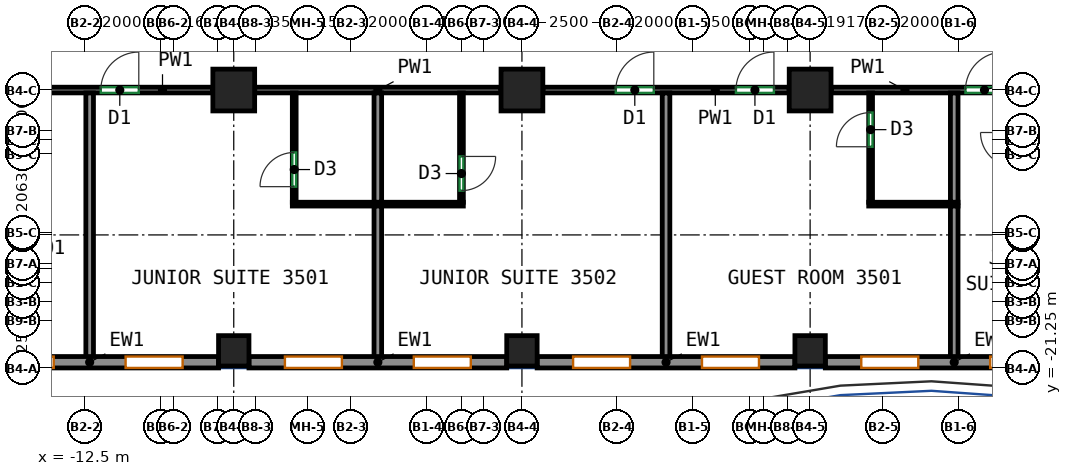
"""IFC4 building model, lengths in metres.
Left out: names, types, materials, properties, quantities, classifications, styles, units other than length and angle.
Written with IfcOpenShell. Run it as: python <this file> out.ifc"""

import sys

from ifc_helpers import new_model, si_unit, direction, frame, frame_2d, origin, origin_2d, place, context, subcontext, project, spatial, rectangle, extrude, source, transform, mapped, element, fill, save


model = new_model("IFC4")
c1 = context("Model", 3, precision=1e-05, world=origin(), true_north=direction((0.0, 1.0)))
c2 = subcontext(c1, "Body", "Model", "MODEL_VIEW")
j1 = project(units=[si_unit("LENGTHUNIT", "METRE"), si_unit("PLANEANGLEUNIT", "RADIAN")], contexts=[c1])
p1 = place(None, origin())
s1 = spatial("IfcSite", under=j1, at=p1, CompositionType="ELEMENT")
p2 = place(p1, origin())
s2 = spatial("IfcBuilding", under=s1, at=p2, CompositionType="ELEMENT")
p3 = place(p2, frame((0.0, 0.0, 154.1)))
s3 = spatial("IfcBuildingStorey", under=s2, at=p3, CompositionType="ELEMENT", Elevation=154.1)
m1 = source(origin(), c2, "Body", "SweptSolid", [
    extrude(rectangle(XDim=0.8, YDim=0.8, at=origin_2d()), origin(), (0.0, 0.0, 1.0), 3.12),
])
p4 = place(p3, frame((-8.583, -20.8, 0.0), z_axis=(0.0, 0.0, 1.0), x_axis=(1.0, 0.0, 0.0)))
e1 = element("IfcColumn", 1, at=p4, inside=s3, PredefinedType="COLUMN", context=c2, shape_type="MappedRepresentation", body=[
    mapped(m1, transform((0.0, 0.0, 0.0))),
])
m2 = source(origin(), c2, "Body", "SweptSolid", [
    extrude(rectangle(XDim=1.1, YDim=1.1, at=origin_2d()), origin(), (0.0, 0.0, 1.0), 3.12),
])
p5 = place(p3, frame((-8.583, -13.938, 0.0), z_axis=(0.0, 0.0, 1.0), x_axis=(1.0, 0.0, 0.0)))
e2 = element("IfcColumn", 2, at=p5, inside=s3, PredefinedType="COLUMN", context=c2, shape_type="MappedRepresentation", body=[
    mapped(m2, transform((0.0, 0.0, 0.0))),
])
p6 = place(p3, frame((-1.0, -20.8, 0.0), z_axis=(0.0, 0.0, 1.0), x_axis=(1.0, 0.0, 0.0)))
e3 = element("IfcColumn", 3, at=p6, inside=s3, PredefinedType="COLUMN", context=c2, shape_type="MappedRepresentation", body=[
    mapped(m1, transform((0.0, 0.0, 0.0))),
])
p7 = place(p3, frame((-1.0, -13.938, 0.0), z_axis=(0.0, 0.0, 1.0), x_axis=(1.0, 0.0, 0.0)))
e4 = element("IfcColumn", 4, at=p7, inside=s3, PredefinedType="COLUMN", context=c2, shape_type="MappedRepresentation", body=[
    mapped(m2, transform((0.0, 0.0, 0.0))),
])
p8 = place(p3, frame((6.583, -20.8, 0.0), z_axis=(0.0, 0.0, 1.0), x_axis=(1.0, 0.0, 0.0)))
e5 = element("IfcColumn", 5, at=p8, inside=s3, PredefinedType="COLUMN", context=c2, shape_type="MappedRepresentation", body=[
    mapped(m1, transform((0.0, 0.0, 0.0))),
])
p9 = place(p3, frame((6.583, -13.938, 0.0), z_axis=(0.0, 0.0, 1.0), x_axis=(1.0, 0.0, 0.0)))
e6 = element("IfcColumn", 6, at=p9, inside=s3, PredefinedType="COLUMN", context=c2, shape_type="MappedRepresentation", body=[
    mapped(m2, transform((0.0, 0.0, 0.0))),
])
m3 = source(origin(), c2, "Body", "SweptSolid", [
    extrude(rectangle(XDim=6.783, YDim=0.3, at=frame_2d((3.392, 0.0))), origin(), (0.0, 0.0, 1.0), 3.12),
])
p10 = place(p3, frame((-15.767, -21.1, 0.0), z_axis=(0.0, 0.0, 1.0), x_axis=(1.0, 0.0, 0.0)))
e7 = element("IfcWall", 7, at=p10, inside=s3, PredefinedType="SOLIDWALL", context=c2, shape_type="MappedRepresentation", body=[
    mapped(m3, transform((0.0, 0.0, 0.0))),
])
p11 = place(p10, frame((0.946, 0.0, 0.85)))
e8 = element("IfcOpeningElement", 8, at=p11, cuts=e7, PredefinedType="OPENING", context=c2, shape_type="SweptSolid", body=[
    extrude(rectangle(XDim=1.5, YDim=1.95, at=frame_2d((0.75, 0.975))), frame((0.0, 0.16, 0.0), z_axis=(0.0, -1.0, 0.0), x_axis=(1.0, 0.0, 0.0)), (0.0, 0.0, 1.0), 0.32),
])
p12 = place(p10, frame((4.338, 0.0, 0.85)))
e9 = element("IfcOpeningElement", 9, at=p12, cuts=e7, PredefinedType="OPENING", context=c2, shape_type="SweptSolid", body=[
    extrude(rectangle(XDim=1.5, YDim=1.95, at=frame_2d((0.75, 0.975))), frame((0.0, 0.16, 0.0), z_axis=(0.0, -1.0, 0.0), x_axis=(1.0, 0.0, 0.0)), (0.0, 0.0, 1.0), 0.32),
])
m4 = source(origin(), c2, "Body", "SweptSolid", [
    extrude(rectangle(XDim=6.783, YDim=0.3, at=frame_2d((3.392, 0.0))), origin(), (0.0, 0.0, 1.0), 3.12),
])
p13 = place(p3, frame((-8.183, -21.1, 0.0), z_axis=(0.0, 0.0, 1.0), x_axis=(1.0, 0.0, 0.0)))
e10 = element("IfcWall", 10, at=p13, inside=s3, PredefinedType="SOLIDWALL", context=c2, shape_type="MappedRepresentation", body=[
    mapped(m4, transform((0.0, 0.0, 0.0))),
])
p14 = place(p13, frame((0.946, 0.0, 0.85)))
e11 = element("IfcOpeningElement", 11, at=p14, cuts=e10, PredefinedType="OPENING", context=c2, shape_type="SweptSolid", body=[
    extrude(rectangle(XDim=1.5, YDim=1.95, at=frame_2d((0.75, 0.975))), frame((0.0, 0.16, 0.0), z_axis=(0.0, -1.0, 0.0), x_axis=(1.0, 0.0, 0.0)), (0.0, 0.0, 1.0), 0.32),
])
p15 = place(p13, frame((4.337, 0.0, 0.85)))
e12 = element("IfcOpeningElement", 12, at=p15, cuts=e10, PredefinedType="OPENING", context=c2, shape_type="SweptSolid", body=[
    extrude(rectangle(XDim=1.5, YDim=1.95, at=frame_2d((0.75, 0.975))), frame((0.0, 0.16, 0.0), z_axis=(0.0, -1.0, 0.0), x_axis=(1.0, 0.0, 0.0)), (0.0, 0.0, 1.0), 0.32),
])
p16 = place(p3, frame((-0.6, -21.1, 0.0), z_axis=(0.0, 0.0, 1.0), x_axis=(1.0, 0.0, 0.0)))
e13 = element("IfcWall", 13, at=p16, inside=s3, PredefinedType="SOLIDWALL", context=c2, shape_type="MappedRepresentation", body=[
    mapped(m4, transform((0.0, 0.0, 0.0))),
])
p17 = place(p16, frame((0.946, 0.0, 0.85)))
e14 = element("IfcOpeningElement", 14, at=p17, cuts=e13, PredefinedType="OPENING", context=c2, shape_type="SweptSolid", body=[
    extrude(rectangle(XDim=1.5, YDim=1.95, at=frame_2d((0.75, 0.975))), frame((0.0, 0.16, 0.0), z_axis=(0.0, -1.0, 0.0), x_axis=(1.0, 0.0, 0.0)), (0.0, 0.0, 1.0), 0.32),
])
p18 = place(p16, frame((4.337, 0.0, 0.85)))
e15 = element("IfcOpeningElement", 15, at=p18, cuts=e13, PredefinedType="OPENING", context=c2, shape_type="SweptSolid", body=[
    extrude(rectangle(XDim=1.5, YDim=1.95, at=frame_2d((0.75, 0.975))), frame((0.0, 0.16, 0.0), z_axis=(0.0, -1.0, 0.0), x_axis=(1.0, 0.0, 0.0)), (0.0, 0.0, 1.0), 0.32),
])
p19 = place(p3, frame((6.983, -21.1, 0.0), z_axis=(0.0, 0.0, 1.0), x_axis=(1.0, 0.0, 0.0)))
e16 = element("IfcWall", 16, at=p19, inside=s3, PredefinedType="SOLIDWALL", context=c2, shape_type="MappedRepresentation", body=[
    mapped(m3, transform((0.0, 0.0, 0.0))),
])
p20 = place(p19, frame((0.946, 0.0, 0.85)))
e17 = element("IfcOpeningElement", 17, at=p20, cuts=e16, PredefinedType="OPENING", context=c2, shape_type="SweptSolid", body=[
    extrude(rectangle(XDim=1.5, YDim=1.95, at=frame_2d((0.75, 0.975))), frame((0.0, 0.16, 0.0), z_axis=(0.0, -1.0, 0.0), x_axis=(1.0, 0.0, 0.0)), (0.0, 0.0, 1.0), 0.32),
])
p21 = place(p19, frame((4.338, 0.0, 0.85)))
e18 = element("IfcOpeningElement", 18, at=p21, cuts=e16, PredefinedType="OPENING", context=c2, shape_type="SweptSolid", body=[
    extrude(rectangle(XDim=1.5, YDim=1.95, at=frame_2d((0.75, 0.975))), frame((0.0, 0.16, 0.0), z_axis=(0.0, -1.0, 0.0), x_axis=(1.0, 0.0, 0.0)), (0.0, 0.0, 1.0), 0.32),
])
p22 = place(p3, frame((-13.55, -13.938, 0.0), z_axis=(0.0, 0.0, 1.0), x_axis=(1.0, 0.0, 0.0)))
e19 = element("IfcWall", 19, at=p22, inside=s3, PredefinedType="PARTITIONING", context=c2, shape_type="SweptSolid", body=[
    extrude(rectangle(XDim=4.417, YDim=0.15, at=frame_2d((2.208, 0.0))), origin(), (0.0, 0.0, 1.0), 3.12),
])
p23 = place(p22, frame((1.468, 0.0, 0.0)))
e20 = element("IfcOpeningElement", 20, at=p23, cuts=e19, PredefinedType="OPENING", context=c2, shape_type="SweptSolid", body=[
    extrude(rectangle(XDim=1.0, YDim=2.1, at=frame_2d((0.5, 1.05))), frame((0.0, 0.085, 0.0), z_axis=(0.0, -1.0, 0.0), x_axis=(1.0, 0.0, 0.0)), (0.0, 0.0, 1.0), 0.17),
])
p24 = place(p3, frame((-8.033, -13.938, 0.0), z_axis=(0.0, 0.0, 1.0), x_axis=(1.0, 0.0, 0.0)))
e21 = element("IfcWall", 21, at=p24, inside=s3, PredefinedType="PARTITIONING", context=c2, shape_type="SweptSolid", body=[
    extrude(rectangle(XDim=6.483, YDim=0.15, at=frame_2d((3.241, 0.0))), origin(), (0.0, 0.0, 1.0), 3.12),
])
p25 = place(p3, frame((-0.45, -13.938, 0.0), z_axis=(0.0, 0.0, 1.0), x_axis=(1.0, 0.0, 0.0)))
e22 = element("IfcWall", 22, at=p25, inside=s3, PredefinedType="PARTITIONING", context=c2, shape_type="SweptSolid", body=[
    extrude(rectangle(XDim=6.483, YDim=0.15, at=frame_2d((3.241, 0.0))), origin(), (0.0, 0.0, 1.0), 3.12),
])
p26 = place(p25, frame((1.92, 0.0, 0.0)))
e23 = element("IfcOpeningElement", 23, at=p26, cuts=e22, PredefinedType="OPENING", context=c2, shape_type="SweptSolid", body=[
    extrude(rectangle(XDim=1.0, YDim=2.1, at=frame_2d((0.5, 1.05))), frame((0.0, 0.085, 0.0), z_axis=(0.0, -1.0, 0.0), x_axis=(1.0, 0.0, 0.0)), (0.0, 0.0, 1.0), 0.17),
])
p27 = place(p25, frame((5.081, 0.0, 0.0)))
e24 = element("IfcOpeningElement", 24, at=p27, cuts=e22, PredefinedType="OPENING", context=c2, shape_type="SweptSolid", body=[
    extrude(rectangle(XDim=1.0, YDim=2.1, at=frame_2d((0.5, 1.05))), frame((0.0, 0.085, 0.0), z_axis=(0.0, -1.0, 0.0), x_axis=(1.0, 0.0, 0.0)), (0.0, 0.0, 1.0), 0.17),
])
p28 = place(p3, frame((7.133, -13.938, 0.0), z_axis=(0.0, 0.0, 1.0), x_axis=(1.0, 0.0, 0.0)))
e25 = element("IfcWall", 25, at=p28, inside=s3, PredefinedType="PARTITIONING", context=c2, shape_type="SweptSolid", body=[
    extrude(rectangle(XDim=6.484, YDim=0.15, at=frame_2d((3.242, 0.0))), origin(), (0.0, 0.0, 1.0), 3.12),
])
p29 = place(p28, frame((3.538, 0.0, 0.0)))
e26 = element("IfcOpeningElement", 26, at=p29, cuts=e25, PredefinedType="OPENING", context=c2, shape_type="SweptSolid", body=[
    extrude(rectangle(XDim=1.0, YDim=2.1, at=frame_2d((0.5, 1.05))), frame((0.0, 0.085, 0.0), z_axis=(0.0, -1.0, 0.0), x_axis=(1.0, 0.0, 0.0)), (0.0, 0.0, 1.0), 0.17),
])
p30 = place(p3, frame((-12.375, -21.0, 0.0), z_axis=(0.0, 0.0, 1.0), x_axis=(0.0, 1.0, 0.0)))
e27 = element("IfcWall", 27, at=p30, inside=s3, PredefinedType="PARTITIONING", context=c2, shape_type="SweptSolid", body=[
    extrude(rectangle(XDim=6.985, YDim=0.2, at=frame_2d((3.493, 0.0))), origin(), (0.0, 0.0, 1.0), 3.12),
])
p31 = place(p3, frame((-6.992, -16.89, 0.0), z_axis=(0.0, 0.0, 1.0), x_axis=(0.0, 1.0, 0.0)))
e28 = element("IfcWall", 28, at=p31, inside=s3, PredefinedType="PARTITIONING", context=c2, shape_type="SweptSolid", body=[
    extrude(rectangle(XDim=2.875, YDim=0.1, at=frame_2d((1.438, 0.0))), origin(), (0.0, 0.0, 1.0), 3.12),
])
p32 = place(p31, frame((0.41, 0.0, 0.0)))
e29 = element("IfcOpeningElement", 29, at=p32, cuts=e28, PredefinedType="OPENING", context=c2, shape_type="SweptSolid", body=[
    extrude(rectangle(XDim=0.9, YDim=2.1, at=frame_2d((0.45, 1.05))), frame((0.0, 0.06, 0.0), z_axis=(0.0, -1.0, 0.0), x_axis=(1.0, 0.0, 0.0)), (0.0, 0.0, 1.0), 0.12),
])
p33 = place(p3, frame((-7.042, -16.94, 0.0), z_axis=(0.0, 0.0, 1.0), x_axis=(1.0, 0.0, 0.0)))
e30 = element("IfcWall", 30, at=p33, inside=s3, PredefinedType="PARTITIONING", context=c2, shape_type="SweptSolid", body=[
    extrude(rectangle(XDim=4.5, YDim=0.1, at=frame_2d((2.25, 0.0))), origin(), (0.0, 0.0, 1.0), 3.12),
])
p34 = place(p3, frame((-4.792, -21.0, 0.0), z_axis=(0.0, 0.0, 1.0), x_axis=(0.0, 1.0, 0.0)))
e31 = element("IfcWall", 31, at=p34, inside=s3, PredefinedType="PARTITIONING", context=c2, shape_type="SweptSolid", body=[
    extrude(rectangle(XDim=4.01, YDim=0.2, at=frame_2d((2.005, 0.0))), origin(), (0.0, 0.0, 1.0), 3.12),
])
p35 = place(p3, frame((-4.792, -16.89, 0.0), z_axis=(0.0, 0.0, 1.0), x_axis=(0.0, 1.0, 0.0)))
e32 = element("IfcWall", 32, at=p35, inside=s3, PredefinedType="PARTITIONING", context=c2, shape_type="SweptSolid", body=[
    extrude(rectangle(XDim=2.875, YDim=0.2, at=frame_2d((1.438, 0.0))), origin(), (0.0, 0.0, 1.0), 3.12),
])
p36 = place(p3, frame((-2.592, -14.015, 0.0), z_axis=(0.0, 0.0, 1.0), x_axis=(0.0, -1.0, 0.0)))
e33 = element("IfcWall", 33, at=p36, inside=s3, PredefinedType="PARTITIONING", context=c2, shape_type="SweptSolid", body=[
    extrude(rectangle(XDim=2.875, YDim=0.1, at=frame_2d((1.438, 0.0))), origin(), (0.0, 0.0, 1.0), 3.12),
])
p37 = place(p36, frame((1.67, 0.0, 0.0)))
e34 = element("IfcOpeningElement", 34, at=p37, cuts=e33, PredefinedType="OPENING", context=c2, shape_type="SweptSolid", body=[
    extrude(rectangle(XDim=0.9, YDim=2.1, at=frame_2d((0.45, 1.05))), frame((0.0, 0.06, 0.0), z_axis=(0.0, -1.0, 0.0), x_axis=(1.0, 0.0, 0.0)), (0.0, 0.0, 1.0), 0.12),
])
p38 = place(p3, frame((2.792, -21.0, 0.0), z_axis=(0.0, 0.0, 1.0), x_axis=(0.0, 1.0, 0.0)))
e35 = element("IfcWall", 35, at=p38, inside=s3, PredefinedType="PARTITIONING", context=c2, shape_type="SweptSolid", body=[
    extrude(rectangle(XDim=6.985, YDim=0.2, at=frame_2d((3.493, 0.0))), origin(), (0.0, 0.0, 1.0), 3.12),
])
p39 = place(p3, frame((8.175, -16.89, 0.0), z_axis=(0.0, 0.0, 1.0), x_axis=(0.0, 1.0, 0.0)))
e36 = element("IfcWall", 36, at=p39, inside=s3, PredefinedType="PARTITIONING", context=c2, shape_type="SweptSolid", body=[
    extrude(rectangle(XDim=2.875, YDim=0.1, at=frame_2d((1.438, 0.0))), origin(), (0.0, 0.0, 1.0), 3.12),
])
p40 = place(p39, frame((1.46, 0.0, 0.0)))
e37 = element("IfcOpeningElement", 37, at=p40, cuts=e36, PredefinedType="OPENING", context=c2, shape_type="SweptSolid", body=[
    extrude(rectangle(XDim=0.9, YDim=2.1, at=frame_2d((0.45, 1.05))), frame((0.0, 0.06, 0.0), z_axis=(0.0, -1.0, 0.0), x_axis=(1.0, 0.0, 0.0)), (0.0, 0.0, 1.0), 0.12),
])
p41 = place(p3, frame((8.125, -16.94, 0.0), z_axis=(0.0, 0.0, 1.0), x_axis=(1.0, 0.0, 0.0)))
e38 = element("IfcWall", 38, at=p41, inside=s3, PredefinedType="PARTITIONING", context=c2, shape_type="SweptSolid", body=[
    extrude(rectangle(XDim=2.35, YDim=0.1, at=frame_2d((1.175, 0.0))), origin(), (0.0, 0.0, 1.0), 3.12),
])
p42 = place(p3, frame((10.375, -21.0, 0.0), z_axis=(0.0, 0.0, 1.0), x_axis=(0.0, 1.0, 0.0)))
e39 = element("IfcWall", 39, at=p42, inside=s3, PredefinedType="PARTITIONING", context=c2, shape_type="SweptSolid", body=[
    extrude(rectangle(XDim=4.01, YDim=0.2, at=frame_2d((2.005, 0.0))), origin(), (0.0, 0.0, 1.0), 3.12),
])
p43 = place(p3, frame((10.375, -16.89, 0.0), z_axis=(0.0, 0.0, 1.0), x_axis=(0.0, 1.0, 0.0)))
e40 = element("IfcWall", 40, at=p43, inside=s3, PredefinedType="PARTITIONING", context=c2, shape_type="SweptSolid", body=[
    extrude(rectangle(XDim=2.875, YDim=0.2, at=frame_2d((1.438, 0.0))), origin(), (0.0, 0.0, 1.0), 3.12),
])
p44 = place(p11, origin())
e41 = element("IfcWindow", 41, at=p44, inside=s3, PartitioningType="SINGLE_PANEL", PredefinedType="WINDOW", context=c2, shape_type="SweptSolid", body=[
    extrude(rectangle(XDim=1.5, YDim=1.95, at=frame_2d((0.75, 0.975))), frame((0.0, 0.03, 0.0), z_axis=(0.0, -1.0, 0.0), x_axis=(1.0, 0.0, 0.0)), (0.0, 0.0, 1.0), 0.06),
])
fill(e8, e41)
p45 = place(p12, origin())
e42 = element("IfcWindow", 42, at=p45, inside=s3, PartitioningType="SINGLE_PANEL", PredefinedType="WINDOW", context=c2, shape_type="SweptSolid", body=[
    extrude(rectangle(XDim=1.5, YDim=1.95, at=frame_2d((0.75, 0.975))), frame((0.0, 0.03, 0.0), z_axis=(0.0, -1.0, 0.0), x_axis=(1.0, 0.0, 0.0)), (0.0, 0.0, 1.0), 0.06),
])
fill(e9, e42)
p46 = place(p14, origin())
e43 = element("IfcWindow", 43, at=p46, inside=s3, PartitioningType="SINGLE_PANEL", PredefinedType="WINDOW", context=c2, shape_type="SweptSolid", body=[
    extrude(rectangle(XDim=1.5, YDim=1.95, at=frame_2d((0.75, 0.975))), frame((0.0, 0.03, 0.0), z_axis=(0.0, -1.0, 0.0), x_axis=(1.0, 0.0, 0.0)), (0.0, 0.0, 1.0), 0.06),
])
fill(e11, e43)
p47 = place(p15, origin())
e44 = element("IfcWindow", 44, at=p47, inside=s3, PartitioningType="SINGLE_PANEL", PredefinedType="WINDOW", context=c2, shape_type="SweptSolid", body=[
    extrude(rectangle(XDim=1.5, YDim=1.95, at=frame_2d((0.75, 0.975))), frame((0.0, 0.03, 0.0), z_axis=(0.0, -1.0, 0.0), x_axis=(1.0, 0.0, 0.0)), (0.0, 0.0, 1.0), 0.06),
])
fill(e12, e44)
p48 = place(p17, origin())
e45 = element("IfcWindow", 45, at=p48, inside=s3, PartitioningType="SINGLE_PANEL", PredefinedType="WINDOW", context=c2, shape_type="SweptSolid", body=[
    extrude(rectangle(XDim=1.5, YDim=1.95, at=frame_2d((0.75, 0.975))), frame((0.0, 0.03, 0.0), z_axis=(0.0, -1.0, 0.0), x_axis=(1.0, 0.0, 0.0)), (0.0, 0.0, 1.0), 0.06),
])
fill(e14, e45)
p49 = place(p18, origin())
e46 = element("IfcWindow", 46, at=p49, inside=s3, PartitioningType="SINGLE_PANEL", PredefinedType="WINDOW", context=c2, shape_type="SweptSolid", body=[
    extrude(rectangle(XDim=1.5, YDim=1.95, at=frame_2d((0.75, 0.975))), frame((0.0, 0.03, 0.0), z_axis=(0.0, -1.0, 0.0), x_axis=(1.0, 0.0, 0.0)), (0.0, 0.0, 1.0), 0.06),
])
fill(e15, e46)
p50 = place(p20, origin())
e47 = element("IfcWindow", 47, at=p50, inside=s3, PartitioningType="SINGLE_PANEL", PredefinedType="WINDOW", context=c2, shape_type="SweptSolid", body=[
    extrude(rectangle(XDim=1.5, YDim=1.95, at=frame_2d((0.75, 0.975))), frame((0.0, 0.03, 0.0), z_axis=(0.0, -1.0, 0.0), x_axis=(1.0, 0.0, 0.0)), (0.0, 0.0, 1.0), 0.06),
])
fill(e17, e47)
p51 = place(p21, origin())
e48 = element("IfcWindow", 48, at=p51, inside=s3, PartitioningType="SINGLE_PANEL", PredefinedType="WINDOW", context=c2, shape_type="SweptSolid", body=[
    extrude(rectangle(XDim=1.5, YDim=1.95, at=frame_2d((0.75, 0.975))), frame((0.0, 0.03, 0.0), z_axis=(0.0, -1.0, 0.0), x_axis=(1.0, 0.0, 0.0)), (0.0, 0.0, 1.0), 0.06),
])
fill(e18, e48)
p52 = place(p37, origin())
e49 = element("IfcDoor", 49, at=p52, inside=s3, OperationType="SINGLE_SWING_LEFT", PredefinedType="DOOR", context=c2, shape_type="SweptSolid", body=[
    extrude(rectangle(XDim=0.9, YDim=2.1, at=frame_2d((0.45, 1.05))), frame((0.0, 0.025, 0.0), z_axis=(0.0, -1.0, 0.0), x_axis=(1.0, 0.0, 0.0)), (0.0, 0.0, 1.0), 0.05),
])
fill(e34, e49)
p53 = place(p32, origin())
e50 = element("IfcDoor", 50, at=p53, inside=s3, OperationType="SINGLE_SWING_LEFT", PredefinedType="DOOR", context=c2, shape_type="SweptSolid", body=[
    extrude(rectangle(XDim=0.9, YDim=2.1, at=frame_2d((0.45, 1.05))), frame((0.0, 0.025, 0.0), z_axis=(0.0, -1.0, 0.0), x_axis=(1.0, 0.0, 0.0)), (0.0, 0.0, 1.0), 0.05),
])
fill(e29, e50)
p54 = place(p40, origin())
e51 = element("IfcDoor", 51, at=p54, inside=s3, OperationType="SINGLE_SWING_LEFT", PredefinedType="DOOR", context=c2, shape_type="SweptSolid", body=[
    extrude(rectangle(XDim=0.9, YDim=2.1, at=frame_2d((0.45, 1.05))), frame((0.0, 0.025, 0.0), z_axis=(0.0, -1.0, 0.0), x_axis=(1.0, 0.0, 0.0)), (0.0, 0.0, 1.0), 0.05),
])
fill(e37, e51)
p55 = place(p23, origin())
e52 = element("IfcDoor", 52, at=p55, inside=s3, OperationType="SINGLE_SWING_RIGHT", PredefinedType="DOOR", context=c2, shape_type="SweptSolid", body=[
    extrude(rectangle(XDim=1.0, YDim=2.1, at=frame_2d((0.5, 1.05))), frame((0.0, 0.025, 0.0), z_axis=(0.0, -1.0, 0.0), x_axis=(1.0, 0.0, 0.0)), (0.0, 0.0, 1.0), 0.05),
])
fill(e20, e52)
p56 = place(p26, origin())
e53 = element("IfcDoor", 53, at=p56, inside=s3, OperationType="SINGLE_SWING_RIGHT", PredefinedType="DOOR", context=c2, shape_type="SweptSolid", body=[
    extrude(rectangle(XDim=1.0, YDim=2.1, at=frame_2d((0.5, 1.05))), frame((0.0, 0.025, 0.0), z_axis=(0.0, -1.0, 0.0), x_axis=(1.0, 0.0, 0.0)), (0.0, 0.0, 1.0), 0.05),
])
fill(e23, e53)
p57 = place(p27, origin())
e54 = element("IfcDoor", 54, at=p57, inside=s3, OperationType="SINGLE_SWING_RIGHT", PredefinedType="DOOR", context=c2, shape_type="SweptSolid", body=[
    extrude(rectangle(XDim=1.0, YDim=2.1, at=frame_2d((0.5, 1.05))), frame((0.0, 0.025, 0.0), z_axis=(0.0, -1.0, 0.0), x_axis=(1.0, 0.0, 0.0)), (0.0, 0.0, 1.0), 0.05),
])
fill(e24, e54)
p58 = place(p29, origin())
e55 = element("IfcDoor", 55, at=p58, inside=s3, OperationType="SINGLE_SWING_RIGHT", PredefinedType="DOOR", context=c2, shape_type="SweptSolid", body=[
    extrude(rectangle(XDim=1.0, YDim=2.1, at=frame_2d((0.5, 1.05))), frame((0.0, 0.025, 0.0), z_axis=(0.0, -1.0, 0.0), x_axis=(1.0, 0.0, 0.0)), (0.0, 0.0, 1.0), 0.05),
])
fill(e26, e55)
save(model, sys.argv[1])
